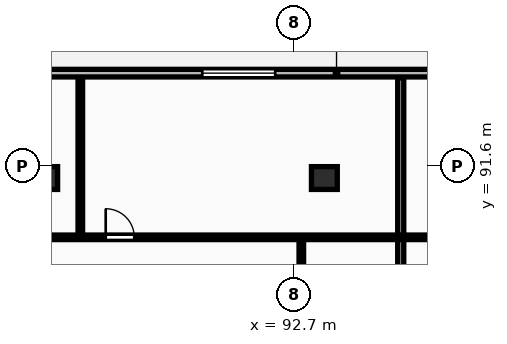
"""IFC4 building model, lengths in metres.
Left out: names, types, materials, properties, quantities, classifications, styles, units other than length and angle.
Written with IfcOpenShell. Run it as: python <this file> out.ifc"""

import sys

from ifc_helpers import new_model, si_unit, direction, frame, frame_2d, origin, origin_2d, place, context, subcontext, project, spatial, rectangle, extrude, element, fill, save


model = new_model("IFC4")
c1 = context("Model", 3, precision=1e-05, world=origin(), true_north=direction((0.0, 1.0)))
c2 = subcontext(c1, "Body", "Model", "MODEL_VIEW")
j1 = project(units=[si_unit("LENGTHUNIT", "METRE"), si_unit("PLANEANGLEUNIT", "RADIAN")], contexts=[c1])
p1 = place(None, origin())
s1 = spatial("IfcSite", under=j1, at=p1, CompositionType="ELEMENT")
p2 = place(p1, origin())
s2 = spatial("IfcBuilding", under=s1, at=p2, CompositionType="ELEMENT")
p3 = place(p2, frame((0.0, 0.0, 201.1)))
s3 = spatial("IfcBuildingStorey", under=s2, at=p3, CompositionType="ELEMENT", Elevation=201.1)
for number, where, z_axis, x_axis in (
    (1, (84.5, 91.2, 0.0), (0.0, 0.0, 1.0), (1.0, 0.0, 0.0)),
    (2, (93.7, 91.2, 0.0), (0.0, 0.0, 1.0), (1.0, 0.0, 0.0)),
):
    element("IfcColumn", number, at=place(p3, frame(where, z_axis=z_axis, x_axis=x_axis)), inside=s3, PredefinedType="COLUMN", context=c2, shape_type="SweptSolid", body=[
        extrude(rectangle(XDim=0.85, YDim=0.75, at=origin_2d()), origin(), (0.0, 0.0, 1.0), 3.25),
    ])
p4 = place(p3, frame((128.4, 94.65, 0.0), z_axis=(0.0, 0.0, 1.0), x_axis=(-1.0, 0.0, 0.0)))
e3 = element("IfcWall", 3, at=p4, inside=s3, PredefinedType="STANDARD", context=c2, shape_type="SweptSolid", body=[
    extrude(rectangle(XDim=68.6, YDim=0.25, at=frame_2d((34.3, 0.0))), origin(), (0.0, 0.0, 1.0), 2.97),
])
p5 = place(p4, frame((63.864, 0.0, 0.0)))
e4 = element("IfcOpeningElement", 4, at=p5, cuts=e3, PredefinedType="OPENING", context=c2, shape_type="SweptSolid", body=[
    extrude(rectangle(XDim=1.8, YDim=2.2, at=frame_2d((0.9, 1.1))), frame((0.0, 0.135, 0.0), z_axis=(0.0, -1.0, 0.0), x_axis=(1.0, 0.0, 0.0)), (0.0, 0.0, 1.0), 0.27),
])
p6 = place(p4, frame((54.713, 0.0, 0.85)))
e5 = element("IfcOpeningElement", 5, at=p6, cuts=e3, PredefinedType="OPENING", context=c2, shape_type="SweptSolid", body=[
    extrude(rectangle(XDim=2.4, YDim=1.9, at=frame_2d((1.2, 0.95))), frame((0.0, 0.135, 0.0), z_axis=(0.0, -1.0, 0.0), x_axis=(1.0, 0.0, 0.0)), (0.0, 0.0, 1.0), 0.27),
])
p7 = place(p4, frame((45.732, 0.0, 0.0)))
e6 = element("IfcOpeningElement", 6, at=p7, cuts=e3, PredefinedType="OPENING", context=c2, shape_type="SweptSolid", body=[
    extrude(rectangle(XDim=1.8, YDim=2.2, at=frame_2d((0.9, 1.1))), frame((0.0, 0.135, 0.0), z_axis=(0.0, -1.0, 0.0), x_axis=(1.0, 0.0, 0.0)), (0.0, 0.0, 1.0), 0.27),
])
p8 = place(p4, frame((36.318, 0.0, 0.85)))
e7 = element("IfcOpeningElement", 7, at=p8, cuts=e3, PredefinedType="OPENING", context=c2, shape_type="SweptSolid", body=[
    extrude(rectangle(XDim=2.4, YDim=1.9, at=frame_2d((1.2, 0.95))), frame((0.0, 0.135, 0.0), z_axis=(0.0, -1.0, 0.0), x_axis=(1.0, 0.0, 0.0)), (0.0, 0.0, 1.0), 0.27),
])
p9 = place(p4, frame((23.021, 0.0, 0.85)))
e8 = element("IfcOpeningElement", 8, at=p9, cuts=e3, PredefinedType="OPENING", context=c2, shape_type="SweptSolid", body=[
    extrude(rectangle(XDim=2.4, YDim=1.9, at=frame_2d((1.2, 0.95))), frame((0.0, 0.135, 0.0), z_axis=(0.0, -1.0, 0.0), x_axis=(1.0, 0.0, 0.0)), (0.0, 0.0, 1.0), 0.27),
])
p10 = place(p4, frame((29.043, 0.0, 0.0)))
e9 = element("IfcOpeningElement", 9, at=p10, cuts=e3, PredefinedType="OPENING", context=c2, shape_type="SweptSolid", body=[
    extrude(rectangle(XDim=1.8, YDim=2.2, at=frame_2d((0.9, 1.1))), frame((0.0, 0.135, 0.0), z_axis=(0.0, -1.0, 0.0), x_axis=(1.0, 0.0, 0.0)), (0.0, 0.0, 1.0), 0.27),
])
p11 = place(p4, frame((17.209, 0.0, 0.85)))
e10 = element("IfcOpeningElement", 10, at=p11, cuts=e3, PredefinedType="OPENING", context=c2, shape_type="SweptSolid", body=[
    extrude(rectangle(XDim=2.4, YDim=1.9, at=frame_2d((1.2, 0.95))), frame((0.0, 0.135, 0.0), z_axis=(0.0, -1.0, 0.0), x_axis=(1.0, 0.0, 0.0)), (0.0, 0.0, 1.0), 0.27),
])
p12 = place(p4, frame((6.712, 0.0, 0.85)))
e11 = element("IfcOpeningElement", 11, at=p12, cuts=e3, PredefinedType="OPENING", context=c2, shape_type="SweptSolid", body=[
    extrude(rectangle(XDim=2.4, YDim=1.9, at=frame_2d((1.2, 0.95))), frame((0.0, 0.135, 0.0), z_axis=(0.0, -1.0, 0.0), x_axis=(1.0, 0.0, 0.0)), (0.0, 0.0, 1.0), 0.27),
])
p13 = place(p4, frame((12.824, 0.0, 0.0)))
e12 = element("IfcOpeningElement", 12, at=p13, cuts=e3, PredefinedType="OPENING", context=c2, shape_type="SweptSolid", body=[
    extrude(rectangle(XDim=1.8, YDim=2.2, at=frame_2d((0.9, 1.1))), frame((0.0, 0.135, 0.0), z_axis=(0.0, -1.0, 0.0), x_axis=(1.0, 0.0, 0.0)), (0.0, 0.0, 1.0), 0.27),
])
p14 = place(p4, frame((1.025, 0.0, 0.85)))
e13 = element("IfcOpeningElement", 13, at=p14, cuts=e3, PredefinedType="OPENING", context=c2, shape_type="SweptSolid", body=[
    extrude(rectangle(XDim=2.4, YDim=1.9, at=frame_2d((1.2, 0.95))), frame((0.0, 0.135, 0.0), z_axis=(0.0, -1.0, 0.0), x_axis=(1.0, 0.0, 0.0)), (0.0, 0.0, 1.0), 0.27),
])
p15 = place(p3, frame((96.212, 70.18, 0.0), z_axis=(0.0, 0.0, 1.0), x_axis=(0.0, 1.0, 0.0)))
e14 = element("IfcWall", 14, at=p15, inside=s3, PredefinedType="PARTITIONING", context=c2, shape_type="SweptSolid", body=[
    extrude(rectangle(XDim=24.32, YDim=0.2, at=frame_2d((12.16, 0.0))), origin(), (0.0, 0.0, 1.0), 2.97),
])
p16 = place(p3, frame((92.942, 70.16, 0.0), z_axis=(0.0, 0.0, 1.0), x_axis=(0.0, 1.0, 0.0)))
e15 = element("IfcWall", 15, at=p16, inside=s3, PredefinedType="PARTITIONING", context=c2, shape_type="SweptSolid", body=[
    extrude(rectangle(XDim=19.03, YDim=0.15, at=frame_2d((9.515, 0.0))), origin(), (0.0, 0.0, 1.0), 2.97),
])
p17 = place(p16, frame((2.406, 0.0, 0.0)))
e16 = element("IfcOpeningElement", 16, at=p17, cuts=e15, PredefinedType="OPENING", context=c2, shape_type="SweptSolid", body=[
    extrude(rectangle(XDim=0.96, YDim=2.1, at=frame_2d((0.48, 1.05))), frame((0.0, 0.085, 0.0), z_axis=(0.0, -1.0, 0.0), x_axis=(1.0, 0.0, 0.0)), (0.0, 0.0, 1.0), 0.17),
])
p18 = place(p16, frame((6.133, 0.0, 0.0)))
e17 = element("IfcOpeningElement", 17, at=p18, cuts=e15, PredefinedType="OPENING", context=c2, shape_type="SweptSolid", body=[
    extrude(rectangle(XDim=0.88, YDim=2.06, at=frame_2d((0.44, 1.03))), frame((0.0, 0.085, 0.0), z_axis=(0.0, -1.0, 0.0), x_axis=(1.0, 0.0, 0.0)), (0.0, 0.0, 1.0), 0.17),
])
p19 = place(p16, frame((11.229, 0.0, 0.0)))
e18 = element("IfcOpeningElement", 18, at=p19, cuts=e15, PredefinedType="OPENING", context=c2, shape_type="SweptSolid", body=[
    extrude(rectangle(XDim=0.84, YDim=2.04, at=frame_2d((0.42, 1.02))), frame((0.0, 0.085, 0.0), z_axis=(0.0, -1.0, 0.0), x_axis=(1.0, 0.0, 0.0)), (0.0, 0.0, 1.0), 0.17),
])
p20 = place(p3, frame((85.672, 89.33, 0.0), z_axis=(0.0, 0.0, 1.0), x_axis=(0.0, 1.0, 0.0)))
e19 = element("IfcWall", 19, at=p20, inside=s3, PredefinedType="PARTITIONING", context=c2, shape_type="SweptSolid", body=[
    extrude(rectangle(XDim=5.17, YDim=0.15, at=frame_2d((2.585, 0.0))), origin(), (0.0, 0.0, 1.0), 2.97),
])
p21 = place(p3, frame((77.823, 89.25, 0.0), z_axis=(0.0, 0.0, 1.0), x_axis=(1.0, 0.0, 0.0)))
e20 = element("IfcWall", 20, at=p21, inside=s3, PredefinedType="PARTITIONING", context=c2, shape_type="SweptSolid", body=[
    extrude(rectangle(XDim=18.308, YDim=0.15, at=frame_2d((9.154, 0.0))), origin(), (0.0, 0.0, 1.0), 2.97),
])
p22 = place(p21, frame((4.095, 0.0, 0.0)))
e21 = element("IfcOpeningElement", 21, at=p22, cuts=e20, PredefinedType="OPENING", context=c2, shape_type="SweptSolid", body=[
    extrude(rectangle(XDim=0.94, YDim=2.1, at=frame_2d((0.47, 1.05))), frame((0.0, 0.085, 0.0), z_axis=(0.0, -1.0, 0.0), x_axis=(1.0, 0.0, 0.0)), (0.0, 0.0, 1.0), 0.17),
])
p23 = place(p21, frame((8.684, 0.0, 0.0)))
e22 = element("IfcOpeningElement", 22, at=p23, cuts=e20, PredefinedType="OPENING", context=c2, shape_type="SweptSolid", body=[
    extrude(rectangle(XDim=0.94, YDim=2.1, at=frame_2d((0.47, 1.05))), frame((0.0, 0.085, 0.0), z_axis=(0.0, -1.0, 0.0), x_axis=(1.0, 0.0, 0.0)), (0.0, 0.0, 1.0), 0.17),
])
p24 = place(p3, frame((96.292, 89.25, 0.0), z_axis=(0.0, 0.0, 1.0), x_axis=(1.0, 0.0, 0.0)))
e23 = element("IfcWall", 23, at=p24, inside=s3, PredefinedType="PARTITIONING", context=c2, shape_type="SweptSolid", body=[
    extrude(rectangle(XDim=11.484, YDim=0.15, at=frame_2d((5.742, 0.0))), origin(), (0.0, 0.0, 1.0), 2.97),
])
p25 = place(p24, frame((3.1, 0.0, 0.0)))
e24 = element("IfcOpeningElement", 24, at=p25, cuts=e23, PredefinedType="OPENING", context=c2, shape_type="SweptSolid", body=[
    extrude(rectangle(XDim=0.94, YDim=2.1, at=frame_2d((0.47, 1.05))), frame((0.0, 0.085, 0.0), z_axis=(0.0, -1.0, 0.0), x_axis=(1.0, 0.0, 0.0)), (0.0, 0.0, 1.0), 0.17),
])
p26 = place(p24, frame((8.261, 0.0, 0.0)))
e25 = element("IfcOpeningElement", 25, at=p26, cuts=e23, PredefinedType="OPENING", context=c2, shape_type="SweptSolid", body=[
    extrude(rectangle(XDim=0.88, YDim=2.06, at=frame_2d((0.44, 1.03))), frame((0.0, 0.085, 0.0), z_axis=(0.0, -1.0, 0.0), x_axis=(1.0, 0.0, 0.0)), (0.0, 0.0, 1.0), 0.17),
])
p27 = place(p8, origin())
e26 = element("IfcWindow", 26, at=p27, inside=s3, PartitioningType="DOUBLE_PANEL_VERTICAL", PredefinedType="WINDOW", context=c2, shape_type="SweptSolid", body=[
    extrude(rectangle(XDim=2.4, YDim=1.9, at=frame_2d((1.2, 0.95))), frame((0.0, 0.03, 0.0), z_axis=(0.0, -1.0, 0.0), x_axis=(1.0, 0.0, 0.0)), (0.0, 0.0, 1.0), 0.06),
])
fill(e7, e26)
p28 = place(p23, origin())
e27 = element("IfcDoor", 27, at=p28, inside=s3, OperationType="SINGLE_SWING_LEFT", PredefinedType="DOOR", context=c2, shape_type="SweptSolid", body=[
    extrude(rectangle(XDim=0.94, YDim=2.1, at=frame_2d((0.47, 1.05))), frame((0.0, 0.025, 0.0), z_axis=(0.0, -1.0, 0.0), x_axis=(1.0, 0.0, 0.0)), (0.0, 0.0, 1.0), 0.05),
])
fill(e22, e27)
save(model, sys.argv[1])
